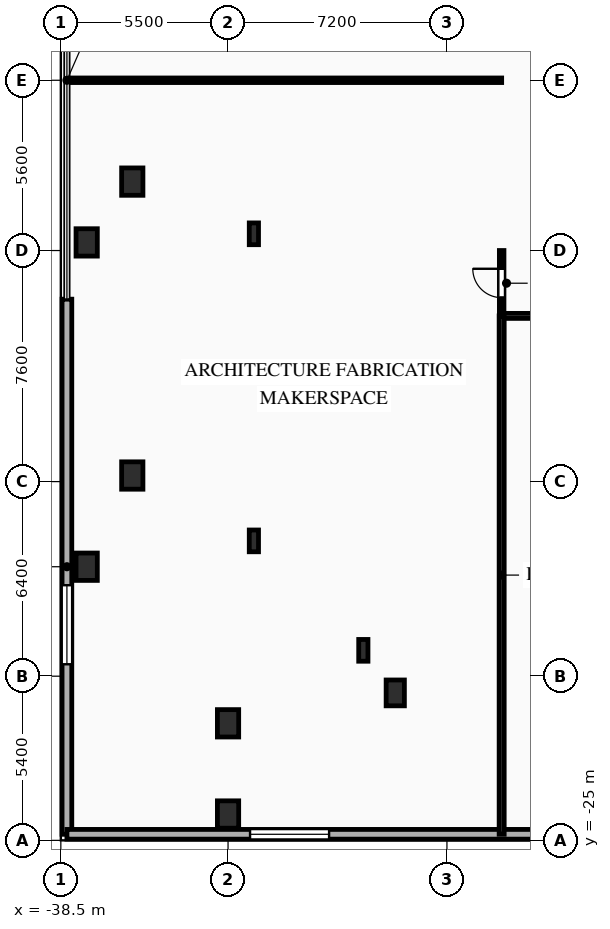
"""IFC4 building model, lengths in metres.
Left out: names, types, materials, properties, quantities, classifications, styles, units other than length and angle.
Written with IfcOpenShell. Run it as: python <this file> out.ifc"""

import sys

from ifc_helpers import new_model, si_unit, direction, frame, frame_2d, origin, origin_2d, place, context, subcontext, project, spatial, rectangle, i_section, extrude, element, fill, save


model = new_model("IFC4")
c1 = context("Model", 3, precision=1e-05, world=origin(), true_north=direction((0.0, 1.0)))
c2 = subcontext(c1, "Body", "Model", "MODEL_VIEW")
j1 = project(units=[si_unit("LENGTHUNIT", "METRE"), si_unit("PLANEANGLEUNIT", "RADIAN")], contexts=[c1])
p1 = place(None, origin())
s1 = spatial("IfcSite", under=j1, at=p1, CompositionType="ELEMENT")
p2 = place(p1, origin())
s2 = spatial("IfcBuilding", under=s1, at=p2, CompositionType="ELEMENT")
p3 = place(p2, frame((0.0, 0.0, 9.0)))
s3 = spatial("IfcBuildingStorey", under=s2, at=p3, CompositionType="ELEMENT", Elevation=9.0)
for number, where, z_axis, x_axis in (
    (1, (-33.0, -21.15, 0.0), (0.0, 0.0, 1.0), (1.0, 0.0, 0.0)),
    (2, (-36.15, -13.0, 0.0), (0.0, 0.0, 1.0), (1.0, 0.0, 0.0)),
    (3, (-36.15, -3.333, 0.0), (0.0, 0.0, 1.0), (1.0, 0.0, 0.0)),
    (4, (-33.0, -24.15, 0.0), (0.0, 0.0, 1.0), (1.0, 0.0, 0.0)),
    (5, (-37.65, -16.0, 0.0), (0.0, 0.0, 1.0), (1.0, 0.0, 0.0)),
    (6, (-37.65, -5.333, 0.0), (0.0, 0.0, 1.0), (1.0, 0.0, 0.0)),
):
    element("IfcColumn", number, at=place(p3, frame(where, z_axis=z_axis, x_axis=x_axis)), inside=s3, PredefinedType="COLUMN", context=c2, shape_type="SweptSolid", body=[
        extrude(rectangle(XDim=0.7, YDim=0.9, at=origin_2d()), origin(), (0.0, 0.0, 1.0), 4.5),
    ])
p4 = place(p3, frame((-27.5, -20.15, 0.0), z_axis=(0.0, 0.0, 1.0), x_axis=(1.0, 0.0, 0.0)))
e7 = element("IfcColumn", 7, at=p4, inside=s3, PredefinedType="PILASTER", context=c2, shape_type="SweptSolid", body=[
    extrude(rectangle(XDim=0.6, YDim=0.85, at=origin_2d()), origin(), (0.0, 0.0, 1.0), 4.5),
])
for number, where, z_axis, x_axis in (
    (8, (-28.55, -18.75, 0.0), (0.0, 0.0, 1.0), (1.0, 0.0, 0.0)),
    (9, (-32.15, -5.05, 0.0), (0.0, 0.0, 1.0), (1.0, 0.0, 0.0)),
    (10, (-32.15, -15.15, 0.0), (0.0, 0.0, 1.0), (1.0, 0.0, 0.0)),
):
    element("IfcColumn", number, at=place(p3, frame(where, z_axis=z_axis, x_axis=x_axis)), inside=s3, PredefinedType="COLUMN", context=c2, shape_type="SweptSolid", body=[
        extrude(i_section(OverallWidth=0.304, OverallDepth=0.716, WebThickness=0.021, FlangeThickness=0.04, FilletRadius=0.027, at=origin_2d()), origin(), (0.0, 0.0, 1.0), 4.5),
    ])
p5 = place(p3, frame((-38.3, -24.8, 0.0), z_axis=(0.0, 0.0, 1.0), x_axis=(0.0, 1.0, 0.0)))
e11 = element("IfcWall", 11, at=p5, inside=s3, PredefinedType="SOLIDWALL", context=c2, shape_type="SweptSolid", body=[
    extrude(rectangle(XDim=17.6, YDim=0.32, at=frame_2d((8.8, 0.0))), origin(), (0.0, 0.0, 1.0), 4.17),
])
p6 = place(p5, frame((5.592, 0.0, 0.85)))
e12 = element("IfcOpeningElement", 12, at=p6, cuts=e11, PredefinedType="OPENING", context=c2, shape_type="SweptSolid", body=[
    extrude(rectangle(XDim=2.6, YDim=2.4, at=frame_2d((1.3, 1.2))), frame((0.0, 0.17, 0.0), z_axis=(0.0, -1.0, 0.0), x_axis=(1.0, 0.0, 0.0)), (0.0, 0.0, 1.0), 0.34),
])
p7 = place(p3, frame((38.3, -24.8, 0.0), z_axis=(0.0, 0.0, 1.0), x_axis=(-1.0, 0.0, 0.0)))
e13 = element("IfcWall", 13, at=p7, inside=s3, PredefinedType="SOLIDWALL", context=c2, shape_type="SweptSolid", body=[
    extrude(rectangle(XDim=76.6, YDim=0.32, at=frame_2d((38.3, 0.0))), origin(), (0.0, 0.0, 1.0), 4.17),
])
p8 = place(p7, frame((6.104, 0.0, 0.85)))
e14 = element("IfcOpeningElement", 14, at=p8, cuts=e13, PredefinedType="OPENING", context=c2, shape_type="SweptSolid", body=[
    extrude(rectangle(XDim=2.6, YDim=2.4, at=frame_2d((1.3, 1.2))), frame((0.0, 0.17, 0.0), z_axis=(0.0, -1.0, 0.0), x_axis=(1.0, 0.0, 0.0)), (0.0, 0.0, 1.0), 0.34),
])
p9 = place(p7, frame((30.797, 0.0, 0.85)))
e15 = element("IfcOpeningElement", 15, at=p9, cuts=e13, PredefinedType="OPENING", context=c2, shape_type="SweptSolid", body=[
    extrude(rectangle(XDim=2.6, YDim=2.4, at=frame_2d((1.3, 1.2))), frame((0.0, 0.17, 0.0), z_axis=(0.0, -1.0, 0.0), x_axis=(1.0, 0.0, 0.0)), (0.0, 0.0, 1.0), 0.34),
])
p10 = place(p7, frame((50.687, 0.0, 0.85)))
e16 = element("IfcOpeningElement", 16, at=p10, cuts=e13, PredefinedType="OPENING", context=c2, shape_type="SweptSolid", body=[
    extrude(rectangle(XDim=2.6, YDim=2.4, at=frame_2d((1.3, 1.2))), frame((0.0, 0.17, 0.0), z_axis=(0.0, -1.0, 0.0), x_axis=(1.0, 0.0, 0.0)), (0.0, 0.0, 1.0), 0.34),
])
p11 = place(p7, frame((67.976, 0.0, 0.85)))
e17 = element("IfcOpeningElement", 17, at=p11, cuts=e13, PredefinedType="OPENING", context=c2, shape_type="SweptSolid", body=[
    extrude(rectangle(XDim=2.6, YDim=2.4, at=frame_2d((1.3, 1.2))), frame((0.0, 0.17, 0.0), z_axis=(0.0, -1.0, 0.0), x_axis=(1.0, 0.0, 0.0)), (0.0, 0.0, 1.0), 0.34),
])
p12 = place(p3, frame((-24.0, -7.75, 0.0), z_axis=(0.0, 0.0, 1.0), x_axis=(0.0, 1.0, 0.0)))
e18 = element("IfcWall", 18, at=p12, inside=s3, PredefinedType="PARTITIONING", context=c2, shape_type="SweptSolid", body=[
    extrude(rectangle(XDim=2.15, YDim=0.15, at=frame_2d((1.075, 0.0))), origin(), (0.0, 0.0, 1.0), 4.17),
])
p13 = place(p12, frame((0.6, 0.0, 0.0)))
e19 = element("IfcOpeningElement", 19, at=p13, cuts=e18, PredefinedType="OPENING", context=c2, shape_type="SweptSolid", body=[
    extrude(rectangle(XDim=0.95, YDim=2.1, at=frame_2d((0.475, 1.05))), frame((0.0, 0.085, 0.0), z_axis=(0.0, -1.0, 0.0), x_axis=(1.0, 0.0, 0.0)), (0.0, 0.0, 1.0), 0.17),
])
p14 = place(p3, frame((-3.32, -7.75, 0.0), z_axis=(0.0, 0.0, 1.0), x_axis=(-1.0, 0.0, 0.0)))
e20 = element("IfcWall", 20, at=p14, inside=s3, PredefinedType="PARTITIONING", context=c2, shape_type="SweptSolid", body=[
    extrude(rectangle(XDim=20.68, YDim=0.165, at=frame_2d((10.34, 0.0))), origin(), (0.0, 0.0, 1.0), 4.17),
])
p15 = place(p14, frame((9.64, 0.0, 0.0)))
e21 = element("IfcOpeningElement", 21, at=p15, cuts=e20, PredefinedType="OPENING", context=c2, shape_type="SweptSolid", body=[
    extrude(rectangle(XDim=1.4, YDim=2.3, at=frame_2d((0.7, 1.15))), frame((0.0, 0.093, 0.0), z_axis=(0.0, -1.0, 0.0), x_axis=(1.0, 0.0, 0.0)), (0.0, 0.0, 1.0), 0.185),
])
p16 = place(p3, frame((-38.3, 0.0, 0.0), z_axis=(0.0, 0.0, 1.0), x_axis=(1.0, 0.0, 0.0)))
e22 = element("IfcWall", 22, at=p16, inside=s3, PredefinedType="PARTITIONING", context=c2, shape_type="SweptSolid", body=[
    extrude(rectangle(XDim=14.3, YDim=0.15, at=frame_2d((7.15, 0.0))), origin(), (0.0, 0.0, 1.0), 4.17),
])
p17 = place(p3, frame((-24.0, -7.75, 0.0), z_axis=(0.0, 0.0, 1.0), x_axis=(0.0, -1.0, 0.0)))
e23 = element("IfcWall", 23, at=p17, inside=s3, PredefinedType="PARTITIONING", context=c2, shape_type="SweptSolid", body=[
    extrude(rectangle(XDim=17.05, YDim=0.165, at=frame_2d((8.525, 0.0))), origin(), (0.0, 0.0, 1.0), 4.17),
])
p18 = place(p6, origin())
e24 = element("IfcWindow", 24, at=p18, inside=s3, PartitioningType="SINGLE_PANEL", PredefinedType="WINDOW", context=c2, shape_type="SweptSolid", body=[
    extrude(rectangle(XDim=2.6, YDim=2.4, at=frame_2d((1.3, 1.2))), frame((0.0, 0.03, 0.0), z_axis=(0.0, -1.0, 0.0), x_axis=(1.0, 0.0, 0.0)), (0.0, 0.0, 1.0), 0.06),
])
fill(e12, e24)
p19 = place(p11, origin())
e25 = element("IfcWindow", 25, at=p19, inside=s3, PartitioningType="SINGLE_PANEL", PredefinedType="WINDOW", context=c2, shape_type="SweptSolid", body=[
    extrude(rectangle(XDim=2.6, YDim=2.4, at=frame_2d((1.3, 1.2))), frame((0.0, 0.03, 0.0), z_axis=(0.0, -1.0, 0.0), x_axis=(1.0, 0.0, 0.0)), (0.0, 0.0, 1.0), 0.06),
])
fill(e17, e25)
p20 = place(p13, origin())
e26 = element("IfcDoor", 26, at=p20, inside=s3, OperationType="SINGLE_SWING_RIGHT", PredefinedType="DOOR", context=c2, shape_type="SweptSolid", body=[
    extrude(rectangle(XDim=0.95, YDim=2.1, at=frame_2d((0.475, 1.05))), frame((0.0, 0.025, 0.0), z_axis=(0.0, -1.0, 0.0), x_axis=(1.0, 0.0, 0.0)), (0.0, 0.0, 1.0), 0.05),
])
fill(e19, e26)
save(model, sys.argv[1])
